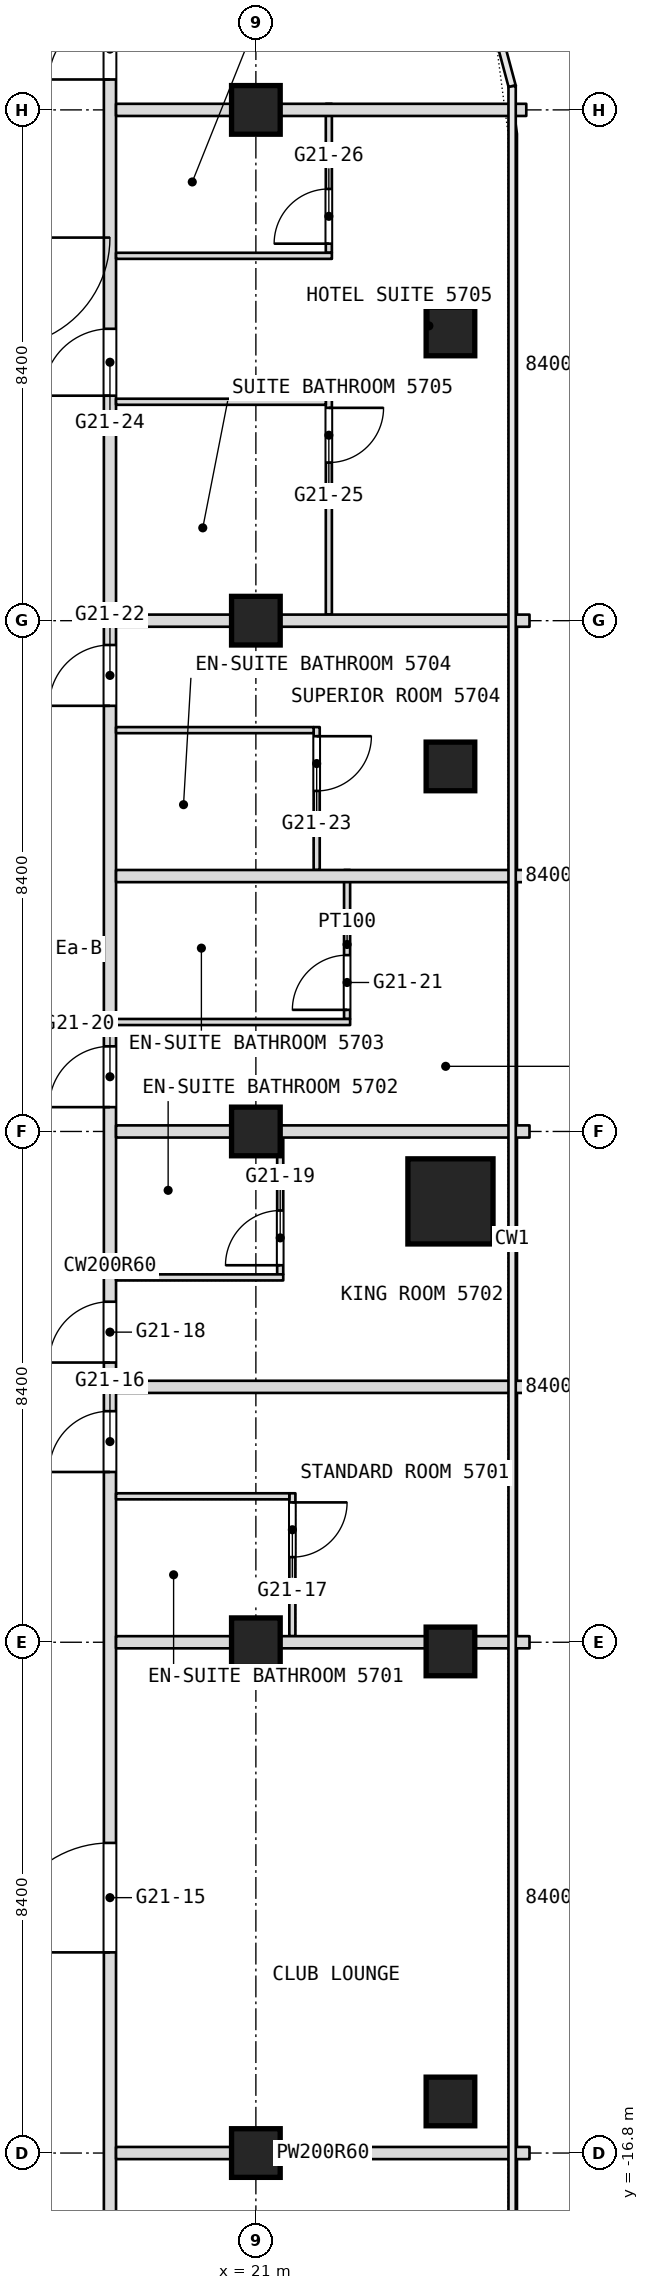
"""IFC4 building model, lengths in metres.
Left out: names, types, materials, properties, quantities, classifications, styles, units other than length and angle.
Written with IfcOpenShell. Run it as: python <this file> out.ifc"""

import sys

from ifc_helpers import new_model, si_unit, direction, frame, frame_2d, origin, origin_2d, place, context, subcontext, project, spatial, rectangle, extrude, element, fill, save


model = new_model("IFC4")
c1 = context("Model", 3, precision=1e-05, world=origin(), true_north=direction((0.0, 1.0)))
c2 = subcontext(c1, "Body", "Model", "MODEL_VIEW")
j1 = project(units=[si_unit("LENGTHUNIT", "METRE"), si_unit("PLANEANGLEUNIT", "RADIAN")], contexts=[c1])
p1 = place(None, origin())
s1 = spatial("IfcSite", under=j1, at=p1, CompositionType="ELEMENT")
p2 = place(p1, origin())
s2 = spatial("IfcBuilding", under=s1, at=p2, CompositionType="ELEMENT")
p3 = place(p2, frame((0.0, 0.0, 241.7)))
s3 = spatial("IfcBuildingStorey", under=s2, at=p3, CompositionType="ELEMENT", Elevation=241.7)
p4 = place(p3, frame((24.2, -1.15, 0.0), z_axis=(0.0, 0.0, 1.0), x_axis=(1.0, 0.0, 0.0)))
e1 = element("IfcColumn", 1, at=p4, inside=s3, PredefinedType="COLUMN", context=c2, shape_type="SweptSolid", body=[
    extrude(rectangle(XDim=1.4, YDim=1.4, at=origin_2d()), origin(), (0.0, 0.0, 1.0), 3.6),
])
for number, where, z_axis, x_axis in (
    (2, (21.0, -16.8, 0.0), (0.0, 0.0, 1.0), (1.0, 0.0, 0.0)),
    (3, (21.0, -8.4, 0.0), (0.0, 0.0, 1.0), (1.0, 0.0, 0.0)),
    (4, (21.0, 0.0, 0.0), (0.0, 0.0, 1.0), (1.0, 0.0, 0.0)),
    (5, (21.0, 8.4, 0.0), (0.0, 0.0, 1.0), (1.0, 0.0, 0.0)),
    (6, (21.0, 16.8, 0.0), (0.0, 0.0, 1.0), (1.0, 0.0, 0.0)),
    (7, (24.2, 13.156, 0.0), (0.0, 0.0, 1.0), (1.0, 0.0, 0.0)),
    (8, (24.2, 6.003, 0.0), (0.0, 0.0, 1.0), (1.0, 0.0, 0.0)),
    (9, (24.2, -8.551, 0.0), (0.0, 0.0, 1.0), (1.0, 0.0, 0.0)),
    (10, (24.2, -15.952, 0.0), (0.0, 0.0, 1.0), (1.0, 0.0, 0.0)),
):
    element("IfcColumn", number, at=place(p3, frame(where, z_axis=z_axis, x_axis=x_axis)), inside=s3, PredefinedType="COLUMN", context=c2, shape_type="SweptSolid", body=[
        extrude(rectangle(XDim=0.8, YDim=0.8, at=origin_2d()), origin(), (0.0, 0.0, 1.0), 3.6),
    ])
p5 = place(p3, frame((22.5, 1.85, 0.0), z_axis=(0.0, 0.0, 1.0), x_axis=(0.0, 1.0, 0.0)))
e11 = element("IfcWall", 11, at=p5, inside=s3, PredefinedType="PARTITIONING", context=c2, shape_type="SweptSolid", body=[
    extrude(rectangle(XDim=2.45, YDim=0.1, at=frame_2d((1.225, 0.0))), origin(), (0.0, 0.0, 1.0), 3.34),
])
p6 = place(p5, frame((0.15, 0.0, 0.0)))
e12 = element("IfcOpeningElement", 12, at=p6, cuts=e11, PredefinedType="OPENING", context=c2, shape_type="SweptSolid", body=[
    extrude(rectangle(XDim=0.9, YDim=2.1, at=frame_2d((0.45, 1.05))), frame((0.0, 0.05, 0.0), z_axis=(0.0, -1.0, 0.0), x_axis=(1.0, 0.0, 0.0)), (0.0, 0.0, 1.0), 0.1),
])
p7 = place(p3, frame((22.2, 8.5, 0.0), z_axis=(0.0, 0.0, 1.0), x_axis=(0.0, 1.0, 0.0)))
e13 = element("IfcWall", 13, at=p7, inside=s3, PredefinedType="PARTITIONING", context=c2, shape_type="SweptSolid", body=[
    extrude(rectangle(XDim=3.55, YDim=0.1, at=frame_2d((1.775, 0.0))), origin(), (0.0, 0.0, 1.0), 3.34),
])
p8 = place(p7, frame((2.5, 0.0, 0.0)))
e14 = element("IfcOpeningElement", 14, at=p8, cuts=e13, PredefinedType="OPENING", context=c2, shape_type="SweptSolid", body=[
    extrude(rectangle(XDim=0.9, YDim=2.1, at=frame_2d((0.45, 1.05))), frame((0.0, 0.05, 0.0), z_axis=(0.0, -1.0, 0.0), x_axis=(1.0, 0.0, 0.0)), (0.0, 0.0, 1.0), 0.1),
])
p9 = place(p3, frame((22.2, 14.45, 0.0), z_axis=(0.0, 0.0, 1.0), x_axis=(0.0, 1.0, 0.0)))
e15 = element("IfcWall", 15, at=p9, inside=s3, PredefinedType="PARTITIONING", context=c2, shape_type="SweptSolid", body=[
    extrude(rectangle(XDim=2.45, YDim=0.1, at=frame_2d((1.225, 0.0))), origin(), (0.0, 0.0, 1.0), 3.34),
])
p10 = place(p9, frame((0.15, 0.0, 0.0)))
e16 = element("IfcOpeningElement", 16, at=p10, cuts=e15, PredefinedType="OPENING", context=c2, shape_type="SweptSolid", body=[
    extrude(rectangle(XDim=0.9, YDim=2.1, at=frame_2d((0.45, 1.05))), frame((0.0, 0.05, 0.0), z_axis=(0.0, -1.0, 0.0), x_axis=(1.0, 0.0, 0.0)), (0.0, 0.0, 1.0), 0.1),
])
p11 = place(p3, frame((22.0, 4.3, 0.0), z_axis=(0.0, 0.0, 1.0), x_axis=(0.0, 1.0, 0.0)))
e17 = element("IfcWall", 17, at=p11, inside=s3, PredefinedType="PARTITIONING", context=c2, shape_type="SweptSolid", body=[
    extrude(rectangle(XDim=2.35, YDim=0.1, at=frame_2d((1.175, 0.0))), origin(), (0.0, 0.0, 1.0), 3.34),
])
p12 = place(p11, frame((1.3, 0.0, 0.0)))
e18 = element("IfcOpeningElement", 18, at=p12, cuts=e17, PredefinedType="OPENING", context=c2, shape_type="SweptSolid", body=[
    extrude(rectangle(XDim=0.9, YDim=2.1, at=frame_2d((0.45, 1.05))), frame((0.0, 0.05, 0.0), z_axis=(0.0, -1.0, 0.0), x_axis=(1.0, 0.0, 0.0)), (0.0, 0.0, 1.0), 0.1),
])
p13 = place(p3, frame((21.6, -8.3, 0.0), z_axis=(0.0, 0.0, 1.0), x_axis=(0.0, 1.0, 0.0)))
e19 = element("IfcWall", 19, at=p13, inside=s3, PredefinedType="PARTITIONING", context=c2, shape_type="SweptSolid", body=[
    extrude(rectangle(XDim=2.35, YDim=0.1, at=frame_2d((1.175, 0.0))), origin(), (0.0, 0.0, 1.0), 3.34),
])
p14 = place(p13, frame((1.3, 0.0, 0.0)))
e20 = element("IfcOpeningElement", 20, at=p14, cuts=e19, PredefinedType="OPENING", context=c2, shape_type="SweptSolid", body=[
    extrude(rectangle(XDim=0.9, YDim=2.1, at=frame_2d((0.45, 1.05))), frame((0.0, 0.05, 0.0), z_axis=(0.0, -1.0, 0.0), x_axis=(1.0, 0.0, 0.0)), (0.0, 0.0, 1.0), 0.1),
])
p15 = place(p3, frame((21.4, -2.35, 0.0), z_axis=(0.0, 0.0, 1.0), x_axis=(0.0, 1.0, 0.0)))
e21 = element("IfcWall", 21, at=p15, inside=s3, PredefinedType="PARTITIONING", context=c2, shape_type="SweptSolid", body=[
    extrude(rectangle(XDim=2.45, YDim=0.1, at=frame_2d((1.225, 0.0))), origin(), (0.0, 0.0, 1.0), 3.34),
])
p16 = place(p15, frame((0.15, 0.0, 0.0)))
e22 = element("IfcOpeningElement", 22, at=p16, cuts=e21, PredefinedType="OPENING", context=c2, shape_type="SweptSolid", body=[
    extrude(rectangle(XDim=0.9, YDim=2.1, at=frame_2d((0.45, 1.05))), frame((0.0, 0.05, 0.0), z_axis=(0.0, -1.0, 0.0), x_axis=(1.0, 0.0, 0.0)), (0.0, 0.0, 1.0), 0.1),
])
p17 = place(p3, frame((18.6, -26.751, 0.0), z_axis=(0.0, 0.0, 1.0), x_axis=(0.0, 1.0, 0.0)))
e23 = element("IfcWall", 23, at=p17, inside=s3, PredefinedType="PARTITIONING", context=c2, shape_type="SweptSolid", body=[
    extrude(rectangle(XDim=49.091, YDim=0.2, at=frame_2d((24.545, 0.0))), origin(), (0.0, 0.0, 1.0), 3.34),
])
p18 = place(p17, frame((4.226, 0.0, 0.0)))
e24 = element("IfcOpeningElement", 24, at=p18, cuts=e23, PredefinedType="OPENING", context=c2, shape_type="SweptSolid", body=[
    extrude(rectangle(XDim=1.8, YDim=2.1, at=frame_2d((0.9, 1.05))), frame((0.0, 0.1, 0.0), z_axis=(0.0, -1.0, 0.0), x_axis=(1.0, 0.0, 0.0)), (0.0, 0.0, 1.0), 0.2),
])
p19 = place(p17, frame((13.251, 0.0, 0.0)))
e25 = element("IfcOpeningElement", 25, at=p19, cuts=e23, PredefinedType="OPENING", context=c2, shape_type="SweptSolid", body=[
    extrude(rectangle(XDim=1.8, YDim=2.1, at=frame_2d((0.9, 1.05))), frame((0.0, 0.1, 0.0), z_axis=(0.0, -1.0, 0.0), x_axis=(1.0, 0.0, 0.0)), (0.0, 0.0, 1.0), 0.2),
])
p20 = place(p17, frame((21.151, 0.0, 0.0)))
e26 = element("IfcOpeningElement", 26, at=p20, cuts=e23, PredefinedType="OPENING", context=c2, shape_type="SweptSolid", body=[
    extrude(rectangle(XDim=1.0, YDim=2.1, at=frame_2d((0.5, 1.05))), frame((0.0, 0.1, 0.0), z_axis=(0.0, -1.0, 0.0), x_axis=(1.0, 0.0, 0.0)), (0.0, 0.0, 1.0), 0.2),
])
p21 = place(p17, frame((22.951, 0.0, 0.0)))
e27 = element("IfcOpeningElement", 27, at=p21, cuts=e23, PredefinedType="OPENING", context=c2, shape_type="SweptSolid", body=[
    extrude(rectangle(XDim=1.0, YDim=2.1, at=frame_2d((0.5, 1.05))), frame((0.0, 0.1, 0.0), z_axis=(0.0, -1.0, 0.0), x_axis=(1.0, 0.0, 0.0)), (0.0, 0.0, 1.0), 0.2),
])
p22 = place(p17, frame((27.151, 0.0, 0.0)))
e28 = element("IfcOpeningElement", 28, at=p22, cuts=e23, PredefinedType="OPENING", context=c2, shape_type="SweptSolid", body=[
    extrude(rectangle(XDim=1.0, YDim=2.1, at=frame_2d((0.5, 1.05))), frame((0.0, 0.1, 0.0), z_axis=(0.0, -1.0, 0.0), x_axis=(1.0, 0.0, 0.0)), (0.0, 0.0, 1.0), 0.2),
])
p23 = place(p17, frame((33.751, 0.0, 0.0)))
e29 = element("IfcOpeningElement", 29, at=p23, cuts=e23, PredefinedType="OPENING", context=c2, shape_type="SweptSolid", body=[
    extrude(rectangle(XDim=1.0, YDim=2.1, at=frame_2d((0.5, 1.05))), frame((0.0, 0.1, 0.0), z_axis=(0.0, -1.0, 0.0), x_axis=(1.0, 0.0, 0.0)), (0.0, 0.0, 1.0), 0.2),
])
p24 = place(p17, frame((38.851, 0.0, 0.0)))
e30 = element("IfcOpeningElement", 30, at=p24, cuts=e23, PredefinedType="OPENING", context=c2, shape_type="SweptSolid", body=[
    extrude(rectangle(XDim=1.1, YDim=2.1, at=frame_2d((0.55, 1.05))), frame((0.0, 0.1, 0.0), z_axis=(0.0, -1.0, 0.0), x_axis=(1.0, 0.0, 0.0)), (0.0, 0.0, 1.0), 0.2),
])
p25 = place(p17, frame((44.051, 0.0, 0.0)))
e31 = element("IfcOpeningElement", 31, at=p25, cuts=e23, PredefinedType="OPENING", context=c2, shape_type="SweptSolid", body=[
    extrude(rectangle(XDim=1.0, YDim=2.1, at=frame_2d((0.5, 1.05))), frame((0.0, 0.1, 0.0), z_axis=(0.0, -1.0, 0.0), x_axis=(1.0, 0.0, 0.0)), (0.0, 0.0, 1.0), 0.2),
])
for number, where, z_axis, x_axis in (
    (32, (18.7, -16.8, 0.0), (0.0, 0.0, 1.0), (1.0, 0.0, 0.0)),
    (33, (18.7, -8.4, 0.0), (0.0, 0.0, 1.0), (1.0, 0.0, 0.0)),
):
    element("IfcWall", number, at=place(p3, frame(where, z_axis=z_axis, x_axis=x_axis)), inside=s3, PredefinedType="PARTITIONING", context=c2, shape_type="SweptSolid", body=[
        extrude(rectangle(XDim=6.8, YDim=0.2, at=frame_2d((3.4, 0.0))), origin(), (0.0, 0.0, 1.0), 2.94),
    ])
p26 = place(p3, frame((18.7, -6.0, 0.0), z_axis=(0.0, 0.0, 1.0), x_axis=(1.0, 0.0, 0.0)))
e34 = element("IfcWall", 34, at=p26, inside=s3, PredefinedType="PARTITIONING", context=c2, shape_type="SweptSolid", body=[
    extrude(rectangle(XDim=2.85, YDim=0.1, at=frame_2d((1.425, 0.0))), origin(), (0.0, 0.0, 1.0), 3.34),
])
p27 = place(p3, frame((18.7, -4.2, 0.0), z_axis=(0.0, 0.0, 1.0), x_axis=(1.0, 0.0, 0.0)))
e35 = element("IfcWall", 35, at=p27, inside=s3, PredefinedType="PARTITIONING", context=c2, shape_type="SweptSolid", body=[
    extrude(rectangle(XDim=6.8, YDim=0.2, at=frame_2d((3.4, 0.0))), origin(), (0.0, 0.0, 1.0), 3.34),
])
p28 = place(p3, frame((18.7, -2.4, 0.0), z_axis=(0.0, 0.0, 1.0), x_axis=(1.0, 0.0, 0.0)))
e36 = element("IfcWall", 36, at=p28, inside=s3, PredefinedType="PARTITIONING", context=c2, shape_type="SweptSolid", body=[
    extrude(rectangle(XDim=2.75, YDim=0.1, at=frame_2d((1.375, 0.0))), origin(), (0.0, 0.0, 1.0), 3.34),
])
p29 = place(p3, frame((18.7, 0.0, 0.0), z_axis=(0.0, 0.0, 1.0), x_axis=(1.0, 0.0, 0.0)))
e37 = element("IfcWall", 37, at=p29, inside=s3, PredefinedType="PARTITIONING", context=c2, shape_type="SweptSolid", body=[
    extrude(rectangle(XDim=6.8, YDim=0.2, at=frame_2d((3.4, 0.0))), origin(), (0.0, 0.0, 1.0), 2.94),
])
p30 = place(p3, frame((18.7, 1.8, 0.0), z_axis=(0.0, 0.0, 1.0), x_axis=(1.0, 0.0, 0.0)))
e38 = element("IfcWall", 38, at=p30, inside=s3, PredefinedType="PARTITIONING", context=c2, shape_type="SweptSolid", body=[
    extrude(rectangle(XDim=3.85, YDim=0.1, at=frame_2d((1.925, 0.0))), origin(), (0.0, 0.0, 1.0), 3.34),
])
p31 = place(p3, frame((18.7, 4.2, 0.0), z_axis=(0.0, 0.0, 1.0), x_axis=(1.0, 0.0, 0.0)))
e39 = element("IfcWall", 39, at=p31, inside=s3, PredefinedType="PARTITIONING", context=c2, shape_type="SweptSolid", body=[
    extrude(rectangle(XDim=6.8, YDim=0.2, at=frame_2d((3.4, 0.0))), origin(), (0.0, 0.0, 1.0), 3.34),
])
p32 = place(p3, frame((18.7, 6.6, 0.0), z_axis=(0.0, 0.0, 1.0), x_axis=(1.0, 0.0, 0.0)))
e40 = element("IfcWall", 40, at=p32, inside=s3, PredefinedType="PARTITIONING", context=c2, shape_type="SweptSolid", body=[
    extrude(rectangle(XDim=3.25, YDim=0.1, at=frame_2d((1.625, 0.0))), origin(), (0.0, 0.0, 1.0), 3.34),
])
p33 = place(p3, frame((18.7, 8.4, 0.0), z_axis=(0.0, 0.0, 1.0), x_axis=(1.0, 0.0, 0.0)))
e41 = element("IfcWall", 41, at=p33, inside=s3, PredefinedType="PARTITIONING", context=c2, shape_type="SweptSolid", body=[
    extrude(rectangle(XDim=6.8, YDim=0.2, at=frame_2d((3.4, 0.0))), origin(), (0.0, 0.0, 1.0), 2.94),
])
p34 = place(p3, frame((18.7, 12.0, 0.0), z_axis=(0.0, 0.0, 1.0), x_axis=(1.0, 0.0, 0.0)))
e42 = element("IfcWall", 42, at=p34, inside=s3, PredefinedType="PARTITIONING", context=c2, shape_type="SweptSolid", body=[
    extrude(rectangle(XDim=3.45, YDim=0.1, at=frame_2d((1.725, 0.0))), origin(), (0.0, 0.0, 1.0), 3.34),
])
p35 = place(p3, frame((18.7, 14.4, 0.0), z_axis=(0.0, 0.0, 1.0), x_axis=(1.0, 0.0, 0.0)))
e43 = element("IfcWall", 43, at=p35, inside=s3, PredefinedType="PARTITIONING", context=c2, shape_type="SweptSolid", body=[
    extrude(rectangle(XDim=3.55, YDim=0.1, at=frame_2d((1.775, 0.0))), origin(), (0.0, 0.0, 1.0), 3.34),
])
p36 = place(p3, frame((18.7, 16.8, 0.0), z_axis=(0.0, 0.0, 1.0), x_axis=(1.0, 0.0, 0.0)))
e44 = element("IfcWall", 44, at=p36, inside=s3, PredefinedType="PARTITIONING", context=c2, shape_type="SweptSolid", body=[
    extrude(rectangle(XDim=6.747, YDim=0.2, at=frame_2d((3.374, 0.0))), origin(), (0.0, 0.0, 1.0), 2.94),
])
p37 = place(p6, origin())
e45 = element("IfcDoor", 45, at=p37, inside=s3, OperationType="SINGLE_SWING_LEFT", PredefinedType="DOOR", context=c2, shape_type="SweptSolid", body=[
    extrude(rectangle(XDim=0.9, YDim=2.1, at=frame_2d((0.45, 1.05))), frame((0.0, 0.025, 0.0), z_axis=(0.0, -1.0, 0.0), x_axis=(1.0, 0.0, 0.0)), (0.0, 0.0, 1.0), 0.05),
])
fill(e12, e45)
p38 = place(p8, origin())
e46 = element("IfcDoor", 46, at=p38, inside=s3, OperationType="SINGLE_SWING_RIGHT", PredefinedType="DOOR", context=c2, shape_type="SweptSolid", body=[
    extrude(rectangle(XDim=0.9, YDim=2.1, at=frame_2d((0.45, 1.05))), frame((0.0, 0.025, 0.0), z_axis=(0.0, -1.0, 0.0), x_axis=(1.0, 0.0, 0.0)), (0.0, 0.0, 1.0), 0.05),
])
fill(e14, e46)
p39 = place(p10, origin())
e47 = element("IfcDoor", 47, at=p39, inside=s3, OperationType="SINGLE_SWING_LEFT", PredefinedType="DOOR", context=c2, shape_type="SweptSolid", body=[
    extrude(rectangle(XDim=0.9, YDim=2.1, at=frame_2d((0.45, 1.05))), frame((0.0, 0.025, 0.0), z_axis=(0.0, -1.0, 0.0), x_axis=(1.0, 0.0, 0.0)), (0.0, 0.0, 1.0), 0.05),
])
fill(e16, e47)
p40 = place(p12, origin())
e48 = element("IfcDoor", 48, at=p40, inside=s3, OperationType="SINGLE_SWING_RIGHT", PredefinedType="DOOR", context=c2, shape_type="SweptSolid", body=[
    extrude(rectangle(XDim=0.9, YDim=2.1, at=frame_2d((0.45, 1.05))), frame((0.0, 0.025, 0.0), z_axis=(0.0, -1.0, 0.0), x_axis=(1.0, 0.0, 0.0)), (0.0, 0.0, 1.0), 0.05),
])
fill(e18, e48)
p41 = place(p14, origin())
e49 = element("IfcDoor", 49, at=p41, inside=s3, OperationType="SINGLE_SWING_RIGHT", PredefinedType="DOOR", context=c2, shape_type="SweptSolid", body=[
    extrude(rectangle(XDim=0.9, YDim=2.1, at=frame_2d((0.45, 1.05))), frame((0.0, 0.025, 0.0), z_axis=(0.0, -1.0, 0.0), x_axis=(1.0, 0.0, 0.0)), (0.0, 0.0, 1.0), 0.05),
])
fill(e20, e49)
p42 = place(p16, origin())
e50 = element("IfcDoor", 50, at=p42, inside=s3, OperationType="SINGLE_SWING_LEFT", PredefinedType="DOOR", context=c2, shape_type="SweptSolid", body=[
    extrude(rectangle(XDim=0.9, YDim=2.1, at=frame_2d((0.45, 1.05))), frame((0.0, 0.025, 0.0), z_axis=(0.0, -1.0, 0.0), x_axis=(1.0, 0.0, 0.0)), (0.0, 0.0, 1.0), 0.05),
])
fill(e22, e50)
p43 = place(p19, origin())
e51 = element("IfcDoor", 51, at=p43, inside=s3, OperationType="DOUBLE_DOOR_SINGLE_SWING", PredefinedType="DOOR", context=c2, shape_type="SweptSolid", body=[
    extrude(rectangle(XDim=1.8, YDim=2.1, at=frame_2d((0.9, 1.05))), frame((0.0, 0.025, 0.0), z_axis=(0.0, -1.0, 0.0), x_axis=(1.0, 0.0, 0.0)), (0.0, 0.0, 1.0), 0.05),
])
fill(e25, e51)
p44 = place(p20, origin())
e52 = element("IfcDoor", 52, at=p44, inside=s3, OperationType="SINGLE_SWING_RIGHT", PredefinedType="DOOR", context=c2, shape_type="SweptSolid", body=[
    extrude(rectangle(XDim=1.0, YDim=2.1, at=frame_2d((0.5, 1.05))), frame((0.0, 0.025, 0.0), z_axis=(0.0, -1.0, 0.0), x_axis=(1.0, 0.0, 0.0)), (0.0, 0.0, 1.0), 0.05),
])
fill(e26, e52)
p45 = place(p21, origin())
e53 = element("IfcDoor", 53, at=p45, inside=s3, OperationType="SINGLE_SWING_RIGHT", PredefinedType="DOOR", context=c2, shape_type="SweptSolid", body=[
    extrude(rectangle(XDim=1.0, YDim=2.1, at=frame_2d((0.5, 1.05))), frame((0.0, 0.025, 0.0), z_axis=(0.0, -1.0, 0.0), x_axis=(1.0, 0.0, 0.0)), (0.0, 0.0, 1.0), 0.05),
])
fill(e27, e53)
p46 = place(p22, origin())
e54 = element("IfcDoor", 54, at=p46, inside=s3, OperationType="SINGLE_SWING_RIGHT", PredefinedType="DOOR", context=c2, shape_type="SweptSolid", body=[
    extrude(rectangle(XDim=1.0, YDim=2.1, at=frame_2d((0.5, 1.05))), frame((0.0, 0.025, 0.0), z_axis=(0.0, -1.0, 0.0), x_axis=(1.0, 0.0, 0.0)), (0.0, 0.0, 1.0), 0.05),
])
fill(e28, e54)
p47 = place(p23, origin())
e55 = element("IfcDoor", 55, at=p47, inside=s3, OperationType="SINGLE_SWING_RIGHT", PredefinedType="DOOR", context=c2, shape_type="SweptSolid", body=[
    extrude(rectangle(XDim=1.0, YDim=2.1, at=frame_2d((0.5, 1.05))), frame((0.0, 0.025, 0.0), z_axis=(0.0, -1.0, 0.0), x_axis=(1.0, 0.0, 0.0)), (0.0, 0.0, 1.0), 0.05),
])
fill(e29, e55)
p48 = place(p24, origin())
e56 = element("IfcDoor", 56, at=p48, inside=s3, OperationType="SINGLE_SWING_RIGHT", PredefinedType="DOOR", context=c2, shape_type="SweptSolid", body=[
    extrude(rectangle(XDim=1.1, YDim=2.1, at=frame_2d((0.55, 1.05))), frame((0.0, 0.025, 0.0), z_axis=(0.0, -1.0, 0.0), x_axis=(1.0, 0.0, 0.0)), (0.0, 0.0, 1.0), 0.05),
])
fill(e30, e56)
p49 = place(p25, origin())
e57 = element("IfcDoor", 57, at=p49, inside=s3, OperationType="SINGLE_SWING_LEFT", PredefinedType="DOOR", context=c2, shape_type="SweptSolid", body=[
    extrude(rectangle(XDim=1.0, YDim=2.1, at=frame_2d((0.5, 1.05))), frame((0.0, 0.025, 0.0), z_axis=(0.0, -1.0, 0.0), x_axis=(1.0, 0.0, 0.0)), (0.0, 0.0, 1.0), 0.05),
])
fill(e31, e57)
save(model, sys.argv[1])
